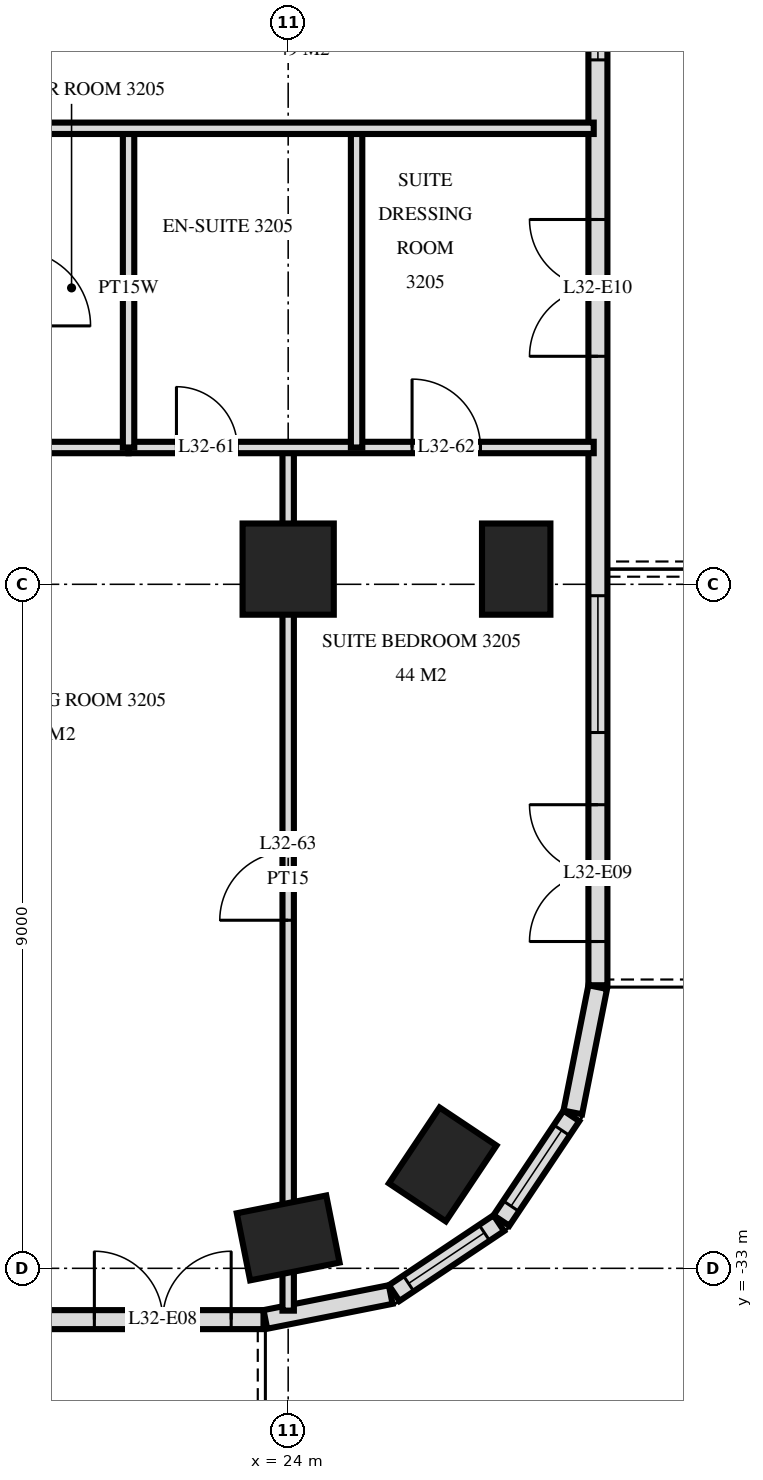
"""IFC4 building model, lengths in metres.
Left out: names, types, materials, properties, quantities, classifications, styles, units other than length and angle.
Written with IfcOpenShell. Run it as: python <this file> out.ifc"""

import sys

from ifc_helpers import new_model, si_unit, direction, frame, frame_2d, origin, origin_2d, place, context, subcontext, project, spatial, rectangle, extrude, element, fill, save


model = new_model("IFC4")
c1 = context("Model", 3, precision=1e-05, world=origin(), true_north=direction((0.0, 1.0)))
c2 = subcontext(c1, "Body", "Model", "MODEL_VIEW")
j1 = project(units=[si_unit("LENGTHUNIT", "METRE"), si_unit("PLANEANGLEUNIT", "RADIAN")], contexts=[c1])
p1 = place(None, origin())
s1 = spatial("IfcSite", under=j1, at=p1, CompositionType="ELEMENT")
p2 = place(p1, origin())
s2 = spatial("IfcBuilding", under=s1, at=p2, CompositionType="ELEMENT")
p3 = place(p2, frame((0.0, 0.0, 127.2)))
s3 = spatial("IfcBuildingStorey", under=s2, at=p3, CompositionType="ELEMENT", Elevation=127.2)
p4 = place(p3, frame((24.0, -32.6, 0.0), z_axis=(0.0, 0.0, 1.0), x_axis=(0.980792089743, 0.195056086032, 0.0)))
e1 = element("IfcColumn", 1, at=p4, inside=s3, PredefinedType="COLUMN", context=c2, shape_type="SweptSolid", body=[
    extrude(rectangle(XDim=1.2, YDim=0.9, at=origin_2d()), origin(), (0.0, 0.0, 1.0), 3.6),
])
p5 = place(p3, frame((24.0, -23.8, 0.0), z_axis=(0.0, 0.0, 1.0), x_axis=(1.0, 0.0, 0.0)))
e2 = element("IfcColumn", 2, at=p5, inside=s3, PredefinedType="COLUMN", context=c2, shape_type="SweptSolid", body=[
    extrude(rectangle(XDim=1.2, YDim=1.2, at=origin_2d()), origin(), (0.0, 0.0, 1.0), 3.6),
])
for number, where, z_axis, x_axis in (
    (3, (26.033, -31.633, 0.0), (0.0, 0.0, 1.0), (0.556, 0.831, 0.0)),
    (4, (27.0, -23.8, 0.0), (0.0, 0.0, 1.0), (0.0, 1.0, 0.0)),
):
    element("IfcColumn", number, at=place(p3, frame(where, z_axis=z_axis, x_axis=x_axis)), inside=s3, PredefinedType="COLUMN", context=c2, shape_type="SweptSolid", body=[
        extrude(rectangle(XDim=1.2, YDim=0.9, at=origin_2d()), origin(), (0.0, 0.0, 1.0), 3.6),
    ])
p6 = place(p3, frame((-23.675, -33.675, 0.0), z_axis=(0.0, 0.0, 1.0), x_axis=(1.0, 0.0, 0.0)))
e5 = element("IfcWall", 5, at=p6, inside=s3, PredefinedType="SOLIDWALL", context=c2, shape_type="SweptSolid", body=[
    extrude(rectangle(XDim=47.351, YDim=0.25, at=frame_2d((23.675, 0.0))), origin(), (0.0, 0.0, 1.0), 3.32),
])
p7 = place(p6, frame((3.425, 0.0, 0.0)))
e6 = element("IfcOpeningElement", 6, at=p7, cuts=e5, PredefinedType="OPENING", context=c2, shape_type="SweptSolid", body=[
    extrude(rectangle(XDim=1.8, YDim=2.4, at=frame_2d((0.9, 1.2))), frame((0.0, 0.135, 0.0), z_axis=(0.0, -1.0, 0.0), x_axis=(1.0, 0.0, 0.0)), (0.0, 0.0, 1.0), 0.27),
])
p8 = place(p6, frame((6.275, 0.0, 0.0)))
e7 = element("IfcOpeningElement", 7, at=p8, cuts=e5, PredefinedType="OPENING", context=c2, shape_type="SweptSolid", body=[
    extrude(rectangle(XDim=1.8, YDim=2.4, at=frame_2d((0.9, 1.2))), frame((0.0, 0.135, 0.0), z_axis=(0.0, -1.0, 0.0), x_axis=(1.0, 0.0, 0.0)), (0.0, 0.0, 1.0), 0.27),
])
p9 = place(p6, frame((8.975, 0.0, 0.3)))
e8 = element("IfcOpeningElement", 8, at=p9, cuts=e5, PredefinedType="OPENING", context=c2, shape_type="SweptSolid", body=[
    extrude(rectangle(XDim=2.4, YDim=2.1, at=frame_2d((1.2, 1.05))), frame((0.0, 0.135, 0.0), z_axis=(0.0, -1.0, 0.0), x_axis=(1.0, 0.0, 0.0)), (0.0, 0.0, 1.0), 0.27),
])
p10 = place(p6, frame((12.275, 0.0, 0.0)))
e9 = element("IfcOpeningElement", 9, at=p10, cuts=e5, PredefinedType="OPENING", context=c2, shape_type="SweptSolid", body=[
    extrude(rectangle(XDim=1.8, YDim=2.4, at=frame_2d((0.9, 1.2))), frame((0.0, 0.135, 0.0), z_axis=(0.0, -1.0, 0.0), x_axis=(1.0, 0.0, 0.0)), (0.0, 0.0, 1.0), 0.27),
])
p11 = place(p6, frame((14.975, 0.0, 0.3)))
e10 = element("IfcOpeningElement", 10, at=p11, cuts=e5, PredefinedType="OPENING", context=c2, shape_type="SweptSolid", body=[
    extrude(rectangle(XDim=2.4, YDim=2.1, at=frame_2d((1.2, 1.05))), frame((0.0, 0.135, 0.0), z_axis=(0.0, -1.0, 0.0), x_axis=(1.0, 0.0, 0.0)), (0.0, 0.0, 1.0), 0.27),
])
p12 = place(p6, frame((17.975, 0.0, 0.3)))
e11 = element("IfcOpeningElement", 11, at=p12, cuts=e5, PredefinedType="OPENING", context=c2, shape_type="SweptSolid", body=[
    extrude(rectangle(XDim=2.4, YDim=2.1, at=frame_2d((1.2, 1.05))), frame((0.0, 0.135, 0.0), z_axis=(0.0, -1.0, 0.0), x_axis=(1.0, 0.0, 0.0)), (0.0, 0.0, 1.0), 0.27),
])
p13 = place(p6, frame((21.275, 0.0, 0.0)))
e12 = element("IfcOpeningElement", 12, at=p13, cuts=e5, PredefinedType="OPENING", context=c2, shape_type="SweptSolid", body=[
    extrude(rectangle(XDim=1.8, YDim=2.4, at=frame_2d((0.9, 1.2))), frame((0.0, 0.135, 0.0), z_axis=(0.0, -1.0, 0.0), x_axis=(1.0, 0.0, 0.0)), (0.0, 0.0, 1.0), 0.27),
])
p14 = place(p6, frame((24.275, 0.0, 0.0)))
e13 = element("IfcOpeningElement", 13, at=p14, cuts=e5, PredefinedType="OPENING", context=c2, shape_type="SweptSolid", body=[
    extrude(rectangle(XDim=1.8, YDim=2.4, at=frame_2d((0.9, 1.2))), frame((0.0, 0.135, 0.0), z_axis=(0.0, -1.0, 0.0), x_axis=(1.0, 0.0, 0.0)), (0.0, 0.0, 1.0), 0.27),
])
p15 = place(p6, frame((26.975, 0.0, 0.3)))
e14 = element("IfcOpeningElement", 14, at=p15, cuts=e5, PredefinedType="OPENING", context=c2, shape_type="SweptSolid", body=[
    extrude(rectangle(XDim=2.4, YDim=2.1, at=frame_2d((1.2, 1.05))), frame((0.0, 0.135, 0.0), z_axis=(0.0, -1.0, 0.0), x_axis=(1.0, 0.0, 0.0)), (0.0, 0.0, 1.0), 0.27),
])
p16 = place(p6, frame((30.275, 0.0, 0.0)))
e15 = element("IfcOpeningElement", 15, at=p16, cuts=e5, PredefinedType="OPENING", context=c2, shape_type="SweptSolid", body=[
    extrude(rectangle(XDim=1.8, YDim=2.4, at=frame_2d((0.9, 1.2))), frame((0.0, 0.135, 0.0), z_axis=(0.0, -1.0, 0.0), x_axis=(1.0, 0.0, 0.0)), (0.0, 0.0, 1.0), 0.27),
])
p17 = place(p6, frame((32.975, 0.0, 0.3)))
e16 = element("IfcOpeningElement", 16, at=p17, cuts=e5, PredefinedType="OPENING", context=c2, shape_type="SweptSolid", body=[
    extrude(rectangle(XDim=2.4, YDim=2.1, at=frame_2d((1.2, 1.05))), frame((0.0, 0.135, 0.0), z_axis=(0.0, -1.0, 0.0), x_axis=(1.0, 0.0, 0.0)), (0.0, 0.0, 1.0), 0.27),
])
p18 = place(p6, frame((36.275, 0.0, 0.0)))
e17 = element("IfcOpeningElement", 17, at=p18, cuts=e5, PredefinedType="OPENING", context=c2, shape_type="SweptSolid", body=[
    extrude(rectangle(XDim=1.8, YDim=2.4, at=frame_2d((0.9, 1.2))), frame((0.0, 0.135, 0.0), z_axis=(0.0, -1.0, 0.0), x_axis=(1.0, 0.0, 0.0)), (0.0, 0.0, 1.0), 0.27),
])
p19 = place(p6, frame((38.975, 0.0, 0.3)))
e18 = element("IfcOpeningElement", 18, at=p19, cuts=e5, PredefinedType="OPENING", context=c2, shape_type="SweptSolid", body=[
    extrude(rectangle(XDim=2.4, YDim=2.1, at=frame_2d((1.2, 1.05))), frame((0.0, 0.135, 0.0), z_axis=(0.0, -1.0, 0.0), x_axis=(1.0, 0.0, 0.0)), (0.0, 0.0, 1.0), 0.27),
])
p20 = place(p6, frame((41.975, 0.0, 0.3)))
e19 = element("IfcOpeningElement", 19, at=p20, cuts=e5, PredefinedType="OPENING", context=c2, shape_type="SweptSolid", body=[
    extrude(rectangle(XDim=2.4, YDim=2.1, at=frame_2d((1.2, 1.05))), frame((0.0, 0.135, 0.0), z_axis=(0.0, -1.0, 0.0), x_axis=(1.0, 0.0, 0.0)), (0.0, 0.0, 1.0), 0.27),
])
p21 = place(p6, frame((45.125, 0.0, 0.0)))
e20 = element("IfcOpeningElement", 20, at=p21, cuts=e5, PredefinedType="OPENING", context=c2, shape_type="SweptSolid", body=[
    extrude(rectangle(XDim=1.8, YDim=2.4, at=frame_2d((0.9, 1.2))), frame((0.0, 0.135, 0.0), z_axis=(0.0, -1.0, 0.0), x_axis=(1.0, 0.0, 0.0)), (0.0, 0.0, 1.0), 0.27),
])
p22 = place(p3, frame((23.7, -33.673, 0.0), z_axis=(0.0, 0.0, 1.0), x_axis=(0.980775640221, 0.19513878023, 0.0)))
e21 = element("IfcWall", 21, at=p22, inside=s3, PredefinedType="SOLIDWALL", context=c2, shape_type="SweptSolid", body=[
    extrude(rectangle(XDim=1.681, YDim=0.25, at=frame_2d((0.841, 0.0))), origin(), (0.0, 0.0, 1.0), 3.32),
])
p23 = place(p3, frame((25.394, -33.326, 0.0), z_axis=(0.0, 0.0, 1.0), x_axis=(0.831482937015, 0.55555029066, 0.0)))
e22 = element("IfcWall", 22, at=p23, inside=s3, PredefinedType="SOLIDWALL", context=c2, shape_type="SweptSolid", body=[
    extrude(rectangle(XDim=1.656, YDim=0.25, at=frame_2d((0.828, 0.0))), origin(), (0.0, 0.0, 1.0), 3.32),
])
p24 = place(p23, frame((0.228, 0.0, 0.9)))
e23 = element("IfcOpeningElement", 23, at=p24, cuts=e22, PredefinedType="OPENING", context=c2, shape_type="SweptSolid", body=[
    extrude(rectangle(XDim=1.2, YDim=1.5, at=frame_2d((0.6, 0.75))), frame((0.0, 0.135, 0.0), z_axis=(0.0, -1.0, 0.0), x_axis=(1.0, 0.0, 0.0)), (0.0, 0.0, 1.0), 0.27),
])
p25 = place(p3, frame((26.806, -32.371, 0.0), z_axis=(0.0, 0.0, 1.0), x_axis=(0.55555029066, 0.831482937015, 0.0)))
e24 = element("IfcWall", 24, at=p25, inside=s3, PredefinedType="SOLIDWALL", context=c2, shape_type="SweptSolid", body=[
    extrude(rectangle(XDim=1.656, YDim=0.25, at=frame_2d((0.828, 0.0))), origin(), (0.0, 0.0, 1.0), 3.32),
])
p26 = place(p25, frame((0.228, 0.0, 0.9)))
e25 = element("IfcOpeningElement", 25, at=p26, cuts=e24, PredefinedType="OPENING", context=c2, shape_type="SweptSolid", body=[
    extrude(rectangle(XDim=1.2, YDim=1.5, at=frame_2d((0.6, 0.75))), frame((0.0, 0.135, 0.0), z_axis=(0.0, -1.0, 0.0), x_axis=(1.0, 0.0, 0.0)), (0.0, 0.0, 1.0), 0.27),
])
p27 = place(p3, frame((27.745, -30.949, 0.0), z_axis=(0.0, 0.0, 1.0), x_axis=(0.194999110559, 0.980803419081, 0.0)))
e26 = element("IfcWall", 26, at=p27, inside=s3, PredefinedType="SOLIDWALL", context=c2, shape_type="SweptSolid", body=[
    extrude(rectangle(XDim=1.681, YDim=0.25, at=frame_2d((0.841, 0.0))), origin(), (0.0, 0.0, 1.0), 3.32),
])
p28 = place(p3, frame((28.075, -29.275, 0.0), z_axis=(0.0, 0.0, 1.0), x_axis=(0.0, 1.0, 0.0)))
e27 = element("IfcWall", 27, at=p28, inside=s3, PredefinedType="SOLIDWALL", context=c2, shape_type="SweptSolid", body=[
    extrude(rectangle(XDim=25.951, YDim=0.25, at=frame_2d((12.975, 0.0))), origin(), (0.0, 0.0, 1.0), 3.32),
])
p29 = place(p28, frame((0.575, 0.0, 0.0)))
e28 = element("IfcOpeningElement", 28, at=p29, cuts=e27, PredefinedType="OPENING", context=c2, shape_type="SweptSolid", body=[
    extrude(rectangle(XDim=1.8, YDim=2.4, at=frame_2d((0.9, 1.2))), frame((0.0, 0.135, 0.0), z_axis=(0.0, -1.0, 0.0), x_axis=(1.0, 0.0, 0.0)), (0.0, 0.0, 1.0), 0.27),
])
p30 = place(p28, frame((3.325, 0.0, 0.3)))
e29 = element("IfcOpeningElement", 29, at=p30, cuts=e27, PredefinedType="OPENING", context=c2, shape_type="SweptSolid", body=[
    extrude(rectangle(XDim=1.8, YDim=2.1, at=frame_2d((0.9, 1.05))), frame((0.0, 0.135, 0.0), z_axis=(0.0, -1.0, 0.0), x_axis=(1.0, 0.0, 0.0)), (0.0, 0.0, 1.0), 0.27),
])
p31 = place(p28, frame((8.275, 0.0, 0.0)))
e30 = element("IfcOpeningElement", 30, at=p31, cuts=e27, PredefinedType="OPENING", context=c2, shape_type="SweptSolid", body=[
    extrude(rectangle(XDim=1.8, YDim=2.4, at=frame_2d((0.9, 1.2))), frame((0.0, 0.135, 0.0), z_axis=(0.0, -1.0, 0.0), x_axis=(1.0, 0.0, 0.0)), (0.0, 0.0, 1.0), 0.27),
])
p32 = place(p28, frame((12.175, 0.0, 0.3)))
e31 = element("IfcOpeningElement", 31, at=p32, cuts=e27, PredefinedType="OPENING", context=c2, shape_type="SweptSolid", body=[
    extrude(rectangle(XDim=1.2, YDim=2.1, at=frame_2d((0.6, 1.05))), frame((0.0, 0.135, 0.0), z_axis=(0.0, -1.0, 0.0), x_axis=(1.0, 0.0, 0.0)), (0.0, 0.0, 1.0), 0.27),
])
p33 = place(p28, frame((16.375, 0.0, 0.0)))
e32 = element("IfcOpeningElement", 32, at=p33, cuts=e27, PredefinedType="OPENING", context=c2, shape_type="SweptSolid", body=[
    extrude(rectangle(XDim=1.8, YDim=2.4, at=frame_2d((0.9, 1.2))), frame((0.0, 0.135, 0.0), z_axis=(0.0, -1.0, 0.0), x_axis=(1.0, 0.0, 0.0)), (0.0, 0.0, 1.0), 0.27),
])
p34 = place(p3, frame((24.9, -22.2, 0.0), z_axis=(0.0, 0.0, 1.0), x_axis=(0.0, 1.0, 0.0)))
e33 = element("IfcWall", 33, at=p34, inside=s3, PredefinedType="PARTITIONING", context=c2, shape_type="SweptSolid", body=[
    extrude(rectangle(XDim=4.2, YDim=0.15, at=frame_2d((2.1, 0.0))), origin(), (0.0, 0.0, 1.0), 3.32),
])
p35 = place(p3, frame((24.0, -33.557, 0.0), z_axis=(0.0, 0.0, 1.0), x_axis=(0.0, 1.0, 0.0)))
e34 = element("IfcWall", 34, at=p35, inside=s3, PredefinedType="PARTITIONING", context=c2, shape_type="SweptSolid", body=[
    extrude(rectangle(XDim=11.357, YDim=0.15, at=frame_2d((5.678, 0.0))), origin(), (0.0, 0.0, 1.0), 3.32),
])
p36 = place(p35, frame((5.137, 0.0, 0.0)))
e35 = element("IfcOpeningElement", 35, at=p36, cuts=e34, PredefinedType="OPENING", context=c2, shape_type="SweptSolid", body=[
    extrude(rectangle(XDim=0.9, YDim=2.1, at=frame_2d((0.45, 1.05))), frame((0.0, 0.085, 0.0), z_axis=(0.0, -1.0, 0.0), x_axis=(1.0, 0.0, 0.0)), (0.0, 0.0, 1.0), 0.17),
])
p37 = place(p3, frame((21.9, -22.2, 0.0), z_axis=(0.0, 0.0, 1.0), x_axis=(0.0, 1.0, 0.0)))
e36 = element("IfcWall", 36, at=p37, inside=s3, PredefinedType="PLUMBINGWALL", context=c2, shape_type="SweptSolid", body=[
    extrude(rectangle(XDim=4.2, YDim=0.15, at=frame_2d((2.1, 0.0))), origin(), (0.0, 0.0, 1.0), 3.32),
])
p38 = place(p3, frame((21.9, -22.2, 0.0), z_axis=(0.0, 0.0, 1.0), x_axis=(1.0, 0.0, 0.0)))
e37 = element("IfcWall", 37, at=p38, inside=s3, PredefinedType="PARTITIONING", context=c2, shape_type="SweptSolid", body=[
    extrude(rectangle(XDim=6.12, YDim=0.15, at=frame_2d((3.06, 0.0))), origin(), (0.0, 0.0, 1.0), 3.32),
])
p39 = place(p38, frame((0.63, 0.0, 0.0)))
e38 = element("IfcOpeningElement", 38, at=p39, cuts=e37, PredefinedType="OPENING", context=c2, shape_type="SweptSolid", body=[
    extrude(rectangle(XDim=0.8, YDim=2.1, at=frame_2d((0.4, 1.05))), frame((0.0, 0.085, 0.0), z_axis=(0.0, -1.0, 0.0), x_axis=(1.0, 0.0, 0.0)), (0.0, 0.0, 1.0), 0.17),
])
p40 = place(p38, frame((3.73, 0.0, 0.0)))
e39 = element("IfcOpeningElement", 39, at=p40, cuts=e37, PredefinedType="OPENING", context=c2, shape_type="SweptSolid", body=[
    extrude(rectangle(XDim=0.9, YDim=2.1, at=frame_2d((0.45, 1.05))), frame((0.0, 0.085, 0.0), z_axis=(0.0, -1.0, 0.0), x_axis=(1.0, 0.0, 0.0)), (0.0, 0.0, 1.0), 0.17),
])
p41 = place(p3, frame((20.4, -22.2, 0.0), z_axis=(0.0, 0.0, 1.0), x_axis=(1.0, 0.0, 0.0)))
e40 = element("IfcWall", 40, at=p41, inside=s3, PredefinedType="PLUMBINGWALL", context=c2, shape_type="SweptSolid", body=[
    extrude(rectangle(XDim=1.5, YDim=0.15, at=frame_2d((0.75, 0.0))), origin(), (0.0, 0.0, 1.0), 3.32),
])
p42 = place(p3, frame((-28.02, -18.0, 0.0), z_axis=(0.0, 0.0, 1.0), x_axis=(1.0, 0.0, 0.0)))
e41 = element("IfcWall", 41, at=p42, inside=s3, PredefinedType="PARTITIONING", context=c2, shape_type="SweptSolid", body=[
    extrude(rectangle(XDim=56.04, YDim=0.15, at=frame_2d((28.02, 0.0))), origin(), (0.0, 0.0, 1.0), 3.32),
])
p43 = place(p42, frame((13.17, 0.0, 0.0)))
e42 = element("IfcOpeningElement", 42, at=p43, cuts=e41, PredefinedType="OPENING", context=c2, shape_type="SweptSolid", body=[
    extrude(rectangle(XDim=1.0, YDim=2.1, at=frame_2d((0.5, 1.05))), frame((0.0, 0.085, 0.0), z_axis=(0.0, -1.0, 0.0), x_axis=(1.0, 0.0, 0.0)), (0.0, 0.0, 1.0), 0.17),
])
p44 = place(p42, frame((11.32, 0.0, 0.0)))
e43 = element("IfcOpeningElement", 43, at=p44, cuts=e41, PredefinedType="OPENING", context=c2, shape_type="SweptSolid", body=[
    extrude(rectangle(XDim=1.0, YDim=2.1, at=frame_2d((0.5, 1.05))), frame((0.0, 0.085, 0.0), z_axis=(0.0, -1.0, 0.0), x_axis=(1.0, 0.0, 0.0)), (0.0, 0.0, 1.0), 0.17),
])
p45 = place(p42, frame((41.87, 0.0, 0.0)))
e44 = element("IfcOpeningElement", 44, at=p45, cuts=e41, PredefinedType="OPENING", context=c2, shape_type="SweptSolid", body=[
    extrude(rectangle(XDim=1.0, YDim=2.1, at=frame_2d((0.5, 1.05))), frame((0.0, 0.085, 0.0), z_axis=(0.0, -1.0, 0.0), x_axis=(1.0, 0.0, 0.0)), (0.0, 0.0, 1.0), 0.17),
])
p46 = place(p42, frame((43.17, 0.0, 0.0)))
e45 = element("IfcOpeningElement", 45, at=p46, cuts=e41, PredefinedType="OPENING", context=c2, shape_type="SweptSolid", body=[
    extrude(rectangle(XDim=1.0, YDim=2.1, at=frame_2d((0.5, 1.05))), frame((0.0, 0.085, 0.0), z_axis=(0.0, -1.0, 0.0), x_axis=(1.0, 0.0, 0.0)), (0.0, 0.0, 1.0), 0.17),
])
p47 = place(p42, frame((46.72, 0.0, 0.0)))
e46 = element("IfcOpeningElement", 46, at=p47, cuts=e41, PredefinedType="OPENING", context=c2, shape_type="SweptSolid", body=[
    extrude(rectangle(XDim=1.0, YDim=2.1, at=frame_2d((0.5, 1.05))), frame((0.0, 0.085, 0.0), z_axis=(0.0, -1.0, 0.0), x_axis=(1.0, 0.0, 0.0)), (0.0, 0.0, 1.0), 0.17),
])
p48 = place(p42, frame((21.52, 0.0, 0.0)))
e47 = element("IfcOpeningElement", 47, at=p48, cuts=e41, PredefinedType="OPENING", context=c2, shape_type="SweptSolid", body=[
    extrude(rectangle(XDim=1.0, YDim=2.1, at=frame_2d((0.5, 1.05))), frame((0.0, 0.085, 0.0), z_axis=(0.0, -1.0, 0.0), x_axis=(1.0, 0.0, 0.0)), (0.0, 0.0, 1.0), 0.17),
])
p49 = place(p42, frame((33.52, 0.0, 0.0)))
e48 = element("IfcOpeningElement", 48, at=p49, cuts=e41, PredefinedType="OPENING", context=c2, shape_type="SweptSolid", body=[
    extrude(rectangle(XDim=1.0, YDim=2.1, at=frame_2d((0.5, 1.05))), frame((0.0, 0.085, 0.0), z_axis=(0.0, -1.0, 0.0), x_axis=(1.0, 0.0, 0.0)), (0.0, 0.0, 1.0), 0.17),
])
p50 = place(p24, origin())
e49 = element("IfcWindow", 49, at=p50, inside=s3, PartitioningType="SINGLE_PANEL", PredefinedType="WINDOW", context=c2, shape_type="SweptSolid", body=[
    extrude(rectangle(XDim=1.2, YDim=1.5, at=frame_2d((0.6, 0.75))), frame((0.0, 0.03, 0.0), z_axis=(0.0, -1.0, 0.0), x_axis=(1.0, 0.0, 0.0)), (0.0, 0.0, 1.0), 0.06),
])
fill(e23, e49)
p51 = place(p26, origin())
e50 = element("IfcWindow", 50, at=p51, inside=s3, PartitioningType="SINGLE_PANEL", PredefinedType="WINDOW", context=c2, shape_type="SweptSolid", body=[
    extrude(rectangle(XDim=1.2, YDim=1.5, at=frame_2d((0.6, 0.75))), frame((0.0, 0.03, 0.0), z_axis=(0.0, -1.0, 0.0), x_axis=(1.0, 0.0, 0.0)), (0.0, 0.0, 1.0), 0.06),
])
fill(e25, e50)
p52 = place(p21, origin())
e51 = element("IfcDoor", 51, at=p52, inside=s3, OperationType="DOUBLE_DOOR_SINGLE_SWING", PredefinedType="DOOR", context=c2, shape_type="SweptSolid", body=[
    extrude(rectangle(XDim=1.8, YDim=2.4, at=frame_2d((0.9, 1.2))), frame((0.0, 0.025, 0.0), z_axis=(0.0, -1.0, 0.0), x_axis=(1.0, 0.0, 0.0)), (0.0, 0.0, 1.0), 0.05),
])
fill(e20, e51)
p53 = place(p29, origin())
e52 = element("IfcDoor", 52, at=p53, inside=s3, OperationType="DOUBLE_DOOR_SINGLE_SWING", PredefinedType="DOOR", context=c2, shape_type="SweptSolid", body=[
    extrude(rectangle(XDim=1.8, YDim=2.4, at=frame_2d((0.9, 1.2))), frame((0.0, 0.025, 0.0), z_axis=(0.0, -1.0, 0.0), x_axis=(1.0, 0.0, 0.0)), (0.0, 0.0, 1.0), 0.05),
])
fill(e28, e52)
p54 = place(p30, origin())
e53 = element("IfcWindow", 53, at=p54, inside=s3, PartitioningType="SINGLE_PANEL", PredefinedType="WINDOW", context=c2, shape_type="SweptSolid", body=[
    extrude(rectangle(XDim=1.8, YDim=2.1, at=frame_2d((0.9, 1.05))), frame((0.0, 0.03, 0.0), z_axis=(0.0, -1.0, 0.0), x_axis=(1.0, 0.0, 0.0)), (0.0, 0.0, 1.0), 0.06),
])
fill(e29, e53)
p55 = place(p31, origin())
e54 = element("IfcDoor", 54, at=p55, inside=s3, OperationType="DOUBLE_DOOR_SINGLE_SWING", PredefinedType="DOOR", context=c2, shape_type="SweptSolid", body=[
    extrude(rectangle(XDim=1.8, YDim=2.4, at=frame_2d((0.9, 1.2))), frame((0.0, 0.025, 0.0), z_axis=(0.0, -1.0, 0.0), x_axis=(1.0, 0.0, 0.0)), (0.0, 0.0, 1.0), 0.05),
])
fill(e30, e54)
p56 = place(p32, origin())
e55 = element("IfcWindow", 55, at=p56, inside=s3, PartitioningType="SINGLE_PANEL", PredefinedType="WINDOW", context=c2, shape_type="SweptSolid", body=[
    extrude(rectangle(XDim=1.2, YDim=2.1, at=frame_2d((0.6, 1.05))), frame((0.0, 0.03, 0.0), z_axis=(0.0, -1.0, 0.0), x_axis=(1.0, 0.0, 0.0)), (0.0, 0.0, 1.0), 0.06),
])
fill(e31, e55)
p57 = place(p39, origin())
e56 = element("IfcDoor", 56, at=p57, inside=s3, OperationType="SINGLE_SWING_RIGHT", PredefinedType="DOOR", context=c2, shape_type="SweptSolid", body=[
    extrude(rectangle(XDim=0.8, YDim=2.1, at=frame_2d((0.4, 1.05))), frame((0.0, 0.025, 0.0), z_axis=(0.0, -1.0, 0.0), x_axis=(1.0, 0.0, 0.0)), (0.0, 0.0, 1.0), 0.05),
])
fill(e38, e56)
p58 = place(p40, origin())
e57 = element("IfcDoor", 57, at=p58, inside=s3, OperationType="SINGLE_SWING_RIGHT", PredefinedType="DOOR", context=c2, shape_type="SweptSolid", body=[
    extrude(rectangle(XDim=0.9, YDim=2.1, at=frame_2d((0.45, 1.05))), frame((0.0, 0.025, 0.0), z_axis=(0.0, -1.0, 0.0), x_axis=(1.0, 0.0, 0.0)), (0.0, 0.0, 1.0), 0.05),
])
fill(e39, e57)
p59 = place(p36, origin())
e58 = element("IfcDoor", 58, at=p59, inside=s3, OperationType="SINGLE_SWING_RIGHT", PredefinedType="DOOR", context=c2, shape_type="SweptSolid", body=[
    extrude(rectangle(XDim=0.9, YDim=2.1, at=frame_2d((0.45, 1.05))), frame((0.0, 0.025, 0.0), z_axis=(0.0, -1.0, 0.0), x_axis=(1.0, 0.0, 0.0)), (0.0, 0.0, 1.0), 0.05),
])
fill(e35, e58)
save(model, sys.argv[1])
